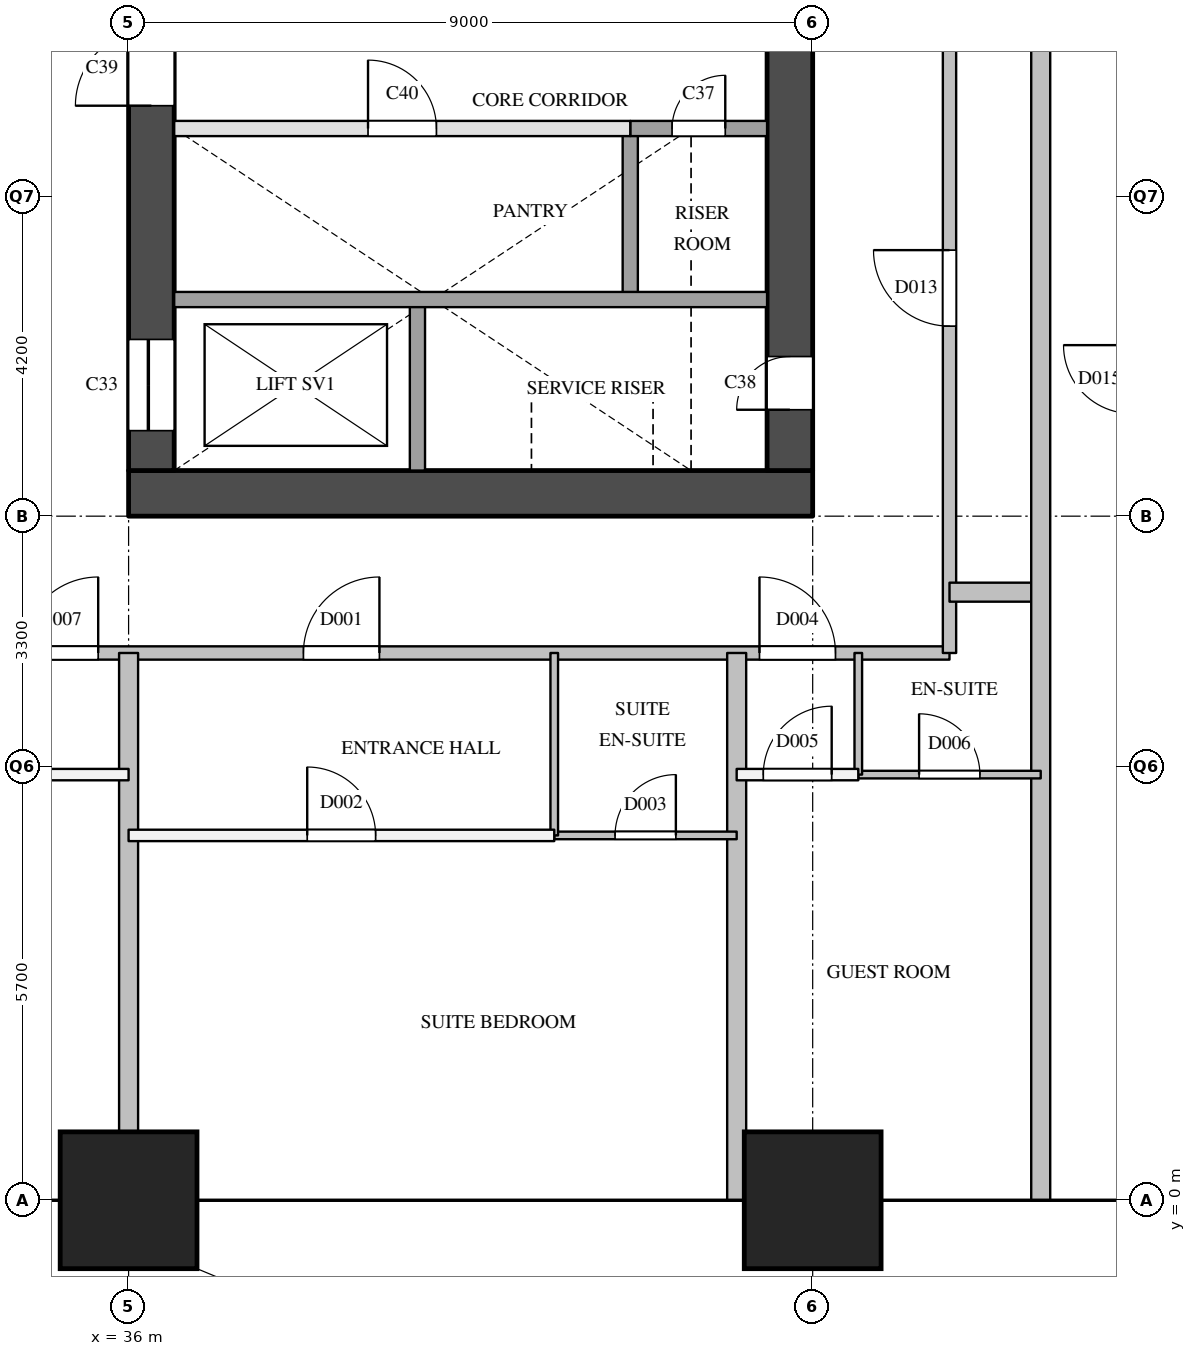
"""IFC4 building model, lengths in metres.
Left out: names, types, materials, properties, quantities, classifications, styles, units other than length and angle.
Written with IfcOpenShell. Run it as: python <this file> out.ifc"""

import sys

from ifc_helpers import new_model, si_unit, direction, frame, frame_2d, origin, origin_2d, place, context, subcontext, project, spatial, rectangle, extrude, element, fill, save


model = new_model("IFC4")
c1 = context("Model", 3, precision=1e-05, world=origin(), true_north=direction((0.0, 1.0)))
c2 = subcontext(c1, "Body", "Model", "MODEL_VIEW")
j1 = project(units=[si_unit("LENGTHUNIT", "METRE"), si_unit("PLANEANGLEUNIT", "RADIAN")], contexts=[c1])
p1 = place(None, origin())
s1 = spatial("IfcSite", under=j1, at=p1, CompositionType="ELEMENT")
p2 = place(p1, origin())
s2 = spatial("IfcBuilding", under=s1, at=p2, CompositionType="ELEMENT")
p3 = place(p2, frame((0.0, 0.0, 81.6)))
s3 = spatial("IfcBuildingStorey", under=s2, at=p3, CompositionType="ELEMENT", Elevation=81.6)
for number, where, z_axis, x_axis in (
    (1, (36.0, 0.0, 0.0), (0.0, 0.0, 1.0), (1.0, 0.0, 0.0)),
    (2, (45.0, 0.0, 0.0), (0.0, 0.0, 1.0), (1.0, 0.0, 0.0)),
):
    element("IfcColumn", number, at=place(p3, frame(where, z_axis=z_axis, x_axis=x_axis)), inside=s3, PredefinedType="COLUMN", context=c2, shape_type="SweptSolid", body=[
        extrude(rectangle(XDim=1.8, YDim=1.8, at=origin_2d()), origin(), (0.0, 0.0, 1.0), 3.8),
    ])
p4 = place(p3, frame((36.0, 9.3, 0.0), z_axis=(0.0, 0.0, 1.0), x_axis=(1.0, 0.0, 0.0)))
e3 = element("IfcWall", 3, at=p4, inside=s3, PredefinedType="SHEAR", context=c2, shape_type="SweptSolid", body=[
    extrude(rectangle(XDim=9.0, YDim=0.6, at=frame_2d((4.5, 0.0))), origin(), (0.0, 0.0, 1.0), 3.5),
])
p5 = place(p3, frame((36.3, 9.6, 0.0), z_axis=(0.0, 0.0, 1.0), x_axis=(0.0, 1.0, 0.0)))
e4 = element("IfcWall", 4, at=p5, inside=s3, PredefinedType="SHEAR", context=c2, shape_type="SweptSolid", body=[
    extrude(rectangle(XDim=12.3, YDim=0.6, at=frame_2d((6.15, 0.0))), origin(), (0.0, 0.0, 1.0), 3.5),
])
p6 = place(p5, frame((0.525, 0.0, 0.0)))
e5 = element("IfcOpeningElement", 5, at=p6, cuts=e4, PredefinedType="OPENING", context=c2, shape_type="SweptSolid", body=[
    extrude(rectangle(XDim=1.2, YDim=2.1, at=frame_2d((0.6, 1.05))), frame((0.0, 0.31, 0.0), z_axis=(0.0, -1.0, 0.0), x_axis=(1.0, 0.0, 0.0)), (0.0, 0.0, 1.0), 0.62),
])
p7 = place(p5, frame((4.8, 0.0, 0.0)))
e6 = element("IfcOpeningElement", 6, at=p7, cuts=e4, PredefinedType="OPENING", context=c2, shape_type="SweptSolid", body=[
    extrude(rectangle(XDim=1.0, YDim=2.1, at=frame_2d((0.5, 1.05))), frame((0.0, 0.31, 0.0), z_axis=(0.0, -1.0, 0.0), x_axis=(1.0, 0.0, 0.0)), (0.0, 0.0, 1.0), 0.62),
])
p8 = place(p3, frame((44.7, 9.6, 0.0), z_axis=(0.0, 0.0, 1.0), x_axis=(0.0, 1.0, 0.0)))
e7 = element("IfcWall", 7, at=p8, inside=s3, PredefinedType="SHEAR", context=c2, shape_type="SweptSolid", body=[
    extrude(rectangle(XDim=12.3, YDim=0.6, at=frame_2d((6.15, 0.0))), origin(), (0.0, 0.0, 1.0), 3.5),
])
p9 = place(p8, frame((0.8, 0.0, 0.0)))
e8 = element("IfcOpeningElement", 8, at=p9, cuts=e7, PredefinedType="OPENING", context=c2, shape_type="SweptSolid", body=[
    extrude(rectangle(XDim=0.7, YDim=2.1, at=frame_2d((0.35, 1.05))), frame((0.0, 0.31, 0.0), z_axis=(0.0, -1.0, 0.0), x_axis=(1.0, 0.0, 0.0)), (0.0, 0.0, 1.0), 0.62),
])
p10 = place(p3, frame((39.8, 9.6, 0.0), z_axis=(0.0, 0.0, 1.0), x_axis=(0.0, 1.0, 0.0)))
e9 = element("IfcWall", 9, at=p10, inside=s3, PredefinedType="SOLIDWALL", context=c2, shape_type="SweptSolid", body=[
    extrude(rectangle(XDim=2.3, YDim=0.2, at=frame_2d((1.15, 0.0))), origin(), (0.0, 0.0, 1.0), 3.5),
])
p11 = place(p3, frame((42.6, 11.9, 0.0), z_axis=(0.0, 0.0, 1.0), x_axis=(0.0, 1.0, 0.0)))
e10 = element("IfcWall", 10, at=p11, inside=s3, PredefinedType="SOLIDWALL", context=c2, shape_type="SweptSolid", body=[
    extrude(rectangle(XDim=2.2, YDim=0.2, at=frame_2d((1.1, 0.0))), origin(), (0.0, 0.0, 1.0), 3.5),
])
p12 = place(p3, frame((36.6, 11.85, 0.0), z_axis=(0.0, 0.0, 1.0), x_axis=(1.0, 0.0, 0.0)))
e11 = element("IfcWall", 11, at=p12, inside=s3, PredefinedType="SOLIDWALL", context=c2, shape_type="SweptSolid", body=[
    extrude(rectangle(XDim=7.8, YDim=0.2, at=frame_2d((3.9, 0.0))), origin(), (0.0, 0.0, 1.0), 3.5),
])
p13 = place(p3, frame((36.6, 14.1, 0.0), z_axis=(0.0, 0.0, 1.0), x_axis=(1.0, 0.0, 0.0)))
e12 = element("IfcWall", 12, at=p13, inside=s3, PredefinedType="PARTITIONING", context=c2, shape_type="SweptSolid", body=[
    extrude(rectangle(XDim=6.0, YDim=0.2, at=frame_2d((3.0, 0.0))), origin(), (0.0, 0.0, 1.0), 3.5),
])
p14 = place(p13, frame((2.55, 0.0, 0.0)))
e13 = element("IfcOpeningElement", 13, at=p14, cuts=e12, PredefinedType="OPENING", context=c2, shape_type="SweptSolid", body=[
    extrude(rectangle(XDim=0.9, YDim=2.1, at=frame_2d((0.45, 1.05))), frame((0.0, 0.11, 0.0), z_axis=(0.0, -1.0, 0.0), x_axis=(1.0, 0.0, 0.0)), (0.0, 0.0, 1.0), 0.22),
])
p15 = place(p3, frame((42.6, 14.1, 0.0), z_axis=(0.0, 0.0, 1.0), x_axis=(1.0, 0.0, 0.0)))
e14 = element("IfcWall", 14, at=p15, inside=s3, PredefinedType="SOLIDWALL", context=c2, shape_type="SweptSolid", body=[
    extrude(rectangle(XDim=1.8, YDim=0.2, at=frame_2d((0.9, 0.0))), origin(), (0.0, 0.0, 1.0), 3.5),
])
p16 = place(p15, frame((0.55, 0.0, 0.0)))
e15 = element("IfcOpeningElement", 15, at=p16, cuts=e14, PredefinedType="OPENING", context=c2, shape_type="SweptSolid", body=[
    extrude(rectangle(XDim=0.7, YDim=2.1, at=frame_2d((0.35, 1.05))), frame((0.0, 0.11, 0.0), z_axis=(0.0, -1.0, 0.0), x_axis=(1.0, 0.0, 0.0)), (0.0, 0.0, 1.0), 0.22),
])
p17 = place(p3, frame((34.2, 7.2, 0.0), z_axis=(0.0, 0.0, 1.0), x_axis=(1.0, 0.0, 0.0)))
e16 = element("IfcWall", 16, at=p17, inside=s3, PredefinedType="PARTITIONING", context=c2, shape_type="SweptSolid", body=[
    extrude(rectangle(XDim=12.6, YDim=0.175, at=frame_2d((6.3, 0.0))), origin(), (0.0, 0.0, 1.0), 3.5),
])
p18 = place(p17, frame((4.1, 0.0, 0.0)))
e17 = element("IfcOpeningElement", 17, at=p18, cuts=e16, PredefinedType="OPENING", context=c2, shape_type="SweptSolid", body=[
    extrude(rectangle(XDim=1.0, YDim=2.1, at=frame_2d((0.5, 1.05))), frame((0.0, 0.097, 0.0), z_axis=(0.0, -1.0, 0.0), x_axis=(1.0, 0.0, 0.0)), (0.0, 0.0, 1.0), 0.195),
])
p19 = place(p17, frame((10.1, 0.0, 0.0)))
e18 = element("IfcOpeningElement", 18, at=p19, cuts=e16, PredefinedType="OPENING", context=c2, shape_type="SweptSolid", body=[
    extrude(rectangle(XDim=1.0, YDim=2.1, at=frame_2d((0.5, 1.05))), frame((0.0, 0.097, 0.0), z_axis=(0.0, -1.0, 0.0), x_axis=(1.0, 0.0, 0.0)), (0.0, 0.0, 1.0), 0.195),
])
p20 = place(p17, frame((0.4, 0.0, 0.0)))
e19 = element("IfcOpeningElement", 19, at=p20, cuts=e16, PredefinedType="OPENING", context=c2, shape_type="SweptSolid", body=[
    extrude(rectangle(XDim=1.0, YDim=2.1, at=frame_2d((0.5, 1.05))), frame((0.0, 0.097, 0.0), z_axis=(0.0, -1.0, 0.0), x_axis=(1.0, 0.0, 0.0)), (0.0, 0.0, 1.0), 0.195),
])
p21 = place(p3, frame((46.8, 7.2, 0.0), z_axis=(0.0, 0.0, 1.0), x_axis=(0.0, 1.0, 0.0)))
e20 = element("IfcWall", 20, at=p21, inside=s3, PredefinedType="PARTITIONING", context=c2, shape_type="SweptSolid", body=[
    extrude(rectangle(XDim=16.49, YDim=0.175, at=frame_2d((8.245, 0.0))), origin(), (0.0, 0.0, 1.0), 3.5),
])
p22 = place(p21, frame((4.3, 0.0, 0.0)))
e21 = element("IfcOpeningElement", 21, at=p22, cuts=e20, PredefinedType="OPENING", context=c2, shape_type="SweptSolid", body=[
    extrude(rectangle(XDim=1.0, YDim=2.1, at=frame_2d((0.5, 1.05))), frame((0.0, 0.097, 0.0), z_axis=(0.0, -1.0, 0.0), x_axis=(1.0, 0.0, 0.0)), (0.0, 0.0, 1.0), 0.195),
])
p23 = place(p21, frame((11.1, 0.0, 0.0)))
e22 = element("IfcOpeningElement", 22, at=p23, cuts=e20, PredefinedType="OPENING", context=c2, shape_type="SweptSolid", body=[
    extrude(rectangle(XDim=1.0, YDim=2.1, at=frame_2d((0.5, 1.05))), frame((0.0, 0.097, 0.0), z_axis=(0.0, -1.0, 0.0), x_axis=(1.0, 0.0, 0.0)), (0.0, 0.0, 1.0), 0.195),
])
p24 = place(p3, frame((36.0, 4.8, 0.0), z_axis=(0.0, 0.0, 1.0), x_axis=(1.0, 0.0, 0.0)))
e23 = element("IfcWall", 23, at=p24, inside=s3, PredefinedType="PARTITIONING", context=c2, shape_type="SweptSolid", body=[
    extrude(rectangle(XDim=5.6, YDim=0.15, at=frame_2d((2.8, 0.0))), origin(), (0.0, 0.0, 1.0), 3.5),
])
p25 = place(p24, frame((2.35, 0.0, 0.0)))
e24 = element("IfcOpeningElement", 24, at=p25, cuts=e23, PredefinedType="OPENING", context=c2, shape_type="SweptSolid", body=[
    extrude(rectangle(XDim=0.9, YDim=2.1, at=frame_2d((0.45, 1.05))), frame((0.0, 0.085, 0.0), z_axis=(0.0, -1.0, 0.0), x_axis=(1.0, 0.0, 0.0)), (0.0, 0.0, 1.0), 0.17),
])
p26 = place(p3, frame((29.4, 5.6, 0.0), z_axis=(0.0, 0.0, 1.0), x_axis=(1.0, 0.0, 0.0)))
e25 = element("IfcWall", 25, at=p26, inside=s3, PredefinedType="PARTITIONING", context=c2, shape_type="SweptSolid", body=[
    extrude(rectangle(XDim=6.6, YDim=0.15, at=frame_2d((3.3, 0.0))), origin(), (0.0, 0.0, 1.0), 3.5),
])
p27 = place(p26, frame((2.85, 0.0, 0.0)))
e26 = element("IfcOpeningElement", 26, at=p27, cuts=e25, PredefinedType="OPENING", context=c2, shape_type="SweptSolid", body=[
    extrude(rectangle(XDim=0.9, YDim=2.1, at=frame_2d((0.45, 1.05))), frame((0.0, 0.085, 0.0), z_axis=(0.0, -1.0, 0.0), x_axis=(1.0, 0.0, 0.0)), (0.0, 0.0, 1.0), 0.17),
])
p28 = place(p3, frame((44.0, 5.6, 0.0), z_axis=(0.0, 0.0, 1.0), x_axis=(1.0, 0.0, 0.0)))
e27 = element("IfcWall", 27, at=p28, inside=s3, PredefinedType="PARTITIONING", context=c2, shape_type="SweptSolid", body=[
    extrude(rectangle(XDim=1.6, YDim=0.15, at=frame_2d((0.8, 0.0))), origin(), (0.0, 0.0, 1.0), 3.5),
])
p29 = place(p28, frame((0.35, 0.0, 0.0)))
e28 = element("IfcOpeningElement", 28, at=p29, cuts=e27, PredefinedType="OPENING", context=c2, shape_type="SweptSolid", body=[
    extrude(rectangle(XDim=0.9, YDim=2.1, at=frame_2d((0.45, 1.05))), frame((0.0, 0.085, 0.0), z_axis=(0.0, -1.0, 0.0), x_axis=(1.0, 0.0, 0.0)), (0.0, 0.0, 1.0), 0.17),
])
p30 = place(p3, frame((46.8, 8.0, 0.0), z_axis=(0.0, 0.0, 1.0), x_axis=(1.0, 0.0, 0.0)))
e29 = element("IfcWall", 29, at=p30, inside=s3, PredefinedType="PARTITIONING", context=c2, shape_type="SweptSolid", body=[
    extrude(rectangle(XDim=1.2, YDim=0.25, at=frame_2d((0.6, 0.0))), origin(), (0.0, 0.0, 1.0), 3.5),
])
p31 = place(p3, frame((36.0, 0.0, 0.0), z_axis=(0.0, 0.0, 1.0), x_axis=(0.0, 1.0, 0.0)))
e30 = element("IfcWall", 30, at=p31, inside=s3, PredefinedType="PARTITIONING", context=c2, shape_type="SweptSolid", body=[
    extrude(rectangle(XDim=7.2, YDim=0.25, at=frame_2d((3.6, 0.0))), origin(), (0.0, 0.0, 1.0), 3.5),
])
p32 = place(p3, frame((44.0, 0.0, 0.0), z_axis=(0.0, 0.0, 1.0), x_axis=(0.0, 1.0, 0.0)))
e31 = element("IfcWall", 31, at=p32, inside=s3, PredefinedType="PARTITIONING", context=c2, shape_type="SweptSolid", body=[
    extrude(rectangle(XDim=7.2, YDim=0.25, at=frame_2d((3.6, 0.0))), origin(), (0.0, 0.0, 1.0), 2.5),
])
p33 = place(p3, frame((48.0, 0.0, 0.0), z_axis=(0.0, 0.0, 1.0), x_axis=(0.0, 1.0, 0.0)))
e32 = element("IfcWall", 32, at=p33, inside=s3, PredefinedType="PARTITIONING", context=c2, shape_type="SweptSolid", body=[
    extrude(rectangle(XDim=16.125, YDim=0.25, at=frame_2d((8.062, 0.0))), origin(), (0.0, 0.0, 1.0), 2.5),
])
p34 = place(p3, frame((41.6, 4.8, 0.0), z_axis=(0.0, 0.0, 1.0), x_axis=(1.0, 0.0, 0.0)))
e33 = element("IfcWall", 33, at=p34, inside=s3, PredefinedType="PARTITIONING", context=c2, shape_type="SweptSolid", body=[
    extrude(rectangle(XDim=2.4, YDim=0.1, at=frame_2d((1.2, 0.0))), origin(), (0.0, 0.0, 1.0), 3.5),
])
p35 = place(p34, frame((0.8, 0.0, 0.0)))
e34 = element("IfcOpeningElement", 34, at=p35, cuts=e33, PredefinedType="OPENING", context=c2, shape_type="SweptSolid", body=[
    extrude(rectangle(XDim=0.8, YDim=2.1, at=frame_2d((0.4, 1.05))), frame((0.0, 0.06, 0.0), z_axis=(0.0, -1.0, 0.0), x_axis=(1.0, 0.0, 0.0)), (0.0, 0.0, 1.0), 0.12),
])
p36 = place(p3, frame((45.6, 5.6, 0.0), z_axis=(0.0, 0.0, 1.0), x_axis=(1.0, 0.0, 0.0)))
e35 = element("IfcWall", 35, at=p36, inside=s3, PredefinedType="PARTITIONING", context=c2, shape_type="SweptSolid", body=[
    extrude(rectangle(XDim=2.4, YDim=0.1, at=frame_2d((1.2, 0.0))), origin(), (0.0, 0.0, 1.0), 3.5),
])
p37 = place(p36, frame((0.8, 0.0, 0.0)))
e36 = element("IfcOpeningElement", 36, at=p37, cuts=e35, PredefinedType="OPENING", context=c2, shape_type="SweptSolid", body=[
    extrude(rectangle(XDim=0.8, YDim=2.1, at=frame_2d((0.4, 1.05))), frame((0.0, 0.06, 0.0), z_axis=(0.0, -1.0, 0.0), x_axis=(1.0, 0.0, 0.0)), (0.0, 0.0, 1.0), 0.12),
])
p38 = place(p3, frame((41.6, 4.8, 0.0), z_axis=(0.0, 0.0, 1.0), x_axis=(0.0, 1.0, 0.0)))
e37 = element("IfcWall", 37, at=p38, inside=s3, PredefinedType="PARTITIONING", context=c2, shape_type="SweptSolid", body=[
    extrude(rectangle(XDim=2.4, YDim=0.1, at=frame_2d((1.2, 0.0))), origin(), (0.0, 0.0, 1.0), 3.5),
])
p39 = place(p3, frame((45.6, 5.6, 0.0), z_axis=(0.0, 0.0, 1.0), x_axis=(0.0, 1.0, 0.0)))
e38 = element("IfcWall", 38, at=p39, inside=s3, PredefinedType="PARTITIONING", context=c2, shape_type="SweptSolid", body=[
    extrude(rectangle(XDim=1.6, YDim=0.1, at=frame_2d((0.8, 0.0))), origin(), (0.0, 0.0, 1.0), 3.5),
])
p40 = place(p6, origin())
e39 = element("IfcDoor", 39, at=p40, inside=s3, OperationType="SLIDING_TO_LEFT", PredefinedType="DOOR", context=c2, shape_type="SweptSolid", body=[
    extrude(rectangle(XDim=1.2, YDim=2.1, at=frame_2d((0.6, 1.05))), frame((0.0, 0.025, 0.0), z_axis=(0.0, -1.0, 0.0), x_axis=(1.0, 0.0, 0.0)), (0.0, 0.0, 1.0), 0.05),
])
fill(e5, e39)
p41 = place(p16, origin())
e40 = element("IfcDoor", 40, at=p41, inside=s3, OperationType="SINGLE_SWING_RIGHT", PredefinedType="DOOR", context=c2, shape_type="SweptSolid", body=[
    extrude(rectangle(XDim=0.7, YDim=2.1, at=frame_2d((0.35, 1.05))), frame((0.0, 0.025, 0.0), z_axis=(0.0, -1.0, 0.0), x_axis=(1.0, 0.0, 0.0)), (0.0, 0.0, 1.0), 0.05),
])
fill(e15, e40)
p42 = place(p9, origin())
e41 = element("IfcDoor", 41, at=p42, inside=s3, OperationType="SINGLE_SWING_LEFT", PredefinedType="DOOR", context=c2, shape_type="SweptSolid", body=[
    extrude(rectangle(XDim=0.7, YDim=2.1, at=frame_2d((0.35, 1.05))), frame((0.0, 0.025, 0.0), z_axis=(0.0, -1.0, 0.0), x_axis=(1.0, 0.0, 0.0)), (0.0, 0.0, 1.0), 0.05),
])
fill(e8, e41)
p43 = place(p7, origin())
e42 = element("IfcDoor", 42, at=p43, inside=s3, OperationType="SINGLE_SWING_LEFT", PredefinedType="DOOR", context=c2, shape_type="SweptSolid", body=[
    extrude(rectangle(XDim=1.0, YDim=2.1, at=frame_2d((0.5, 1.05))), frame((0.0, 0.025, 0.0), z_axis=(0.0, -1.0, 0.0), x_axis=(1.0, 0.0, 0.0)), (0.0, 0.0, 1.0), 0.05),
])
fill(e6, e42)
p44 = place(p14, origin())
e43 = element("IfcDoor", 43, at=p44, inside=s3, OperationType="SINGLE_SWING_LEFT", PredefinedType="DOOR", context=c2, shape_type="SweptSolid", body=[
    extrude(rectangle(XDim=0.9, YDim=2.1, at=frame_2d((0.45, 1.05))), frame((0.0, 0.025, 0.0), z_axis=(0.0, -1.0, 0.0), x_axis=(1.0, 0.0, 0.0)), (0.0, 0.0, 1.0), 0.05),
])
fill(e13, e43)
p45 = place(p18, origin())
e44 = element("IfcDoor", 44, at=p45, inside=s3, OperationType="SINGLE_SWING_RIGHT", PredefinedType="DOOR", context=c2, shape_type="SweptSolid", body=[
    extrude(rectangle(XDim=1.0, YDim=2.1, at=frame_2d((0.5, 1.05))), frame((0.0, 0.025, 0.0), z_axis=(0.0, -1.0, 0.0), x_axis=(1.0, 0.0, 0.0)), (0.0, 0.0, 1.0), 0.05),
])
fill(e17, e44)
p46 = place(p25, origin())
e45 = element("IfcDoor", 45, at=p46, inside=s3, OperationType="SINGLE_SWING_LEFT", PredefinedType="DOOR", context=c2, shape_type="SweptSolid", body=[
    extrude(rectangle(XDim=0.9, YDim=2.1, at=frame_2d((0.45, 1.05))), frame((0.0, 0.025, 0.0), z_axis=(0.0, -1.0, 0.0), x_axis=(1.0, 0.0, 0.0)), (0.0, 0.0, 1.0), 0.05),
])
fill(e24, e45)
p47 = place(p35, origin())
e46 = element("IfcDoor", 46, at=p47, inside=s3, OperationType="SINGLE_SWING_RIGHT", PredefinedType="DOOR", context=c2, shape_type="SweptSolid", body=[
    extrude(rectangle(XDim=0.8, YDim=2.1, at=frame_2d((0.4, 1.05))), frame((0.0, 0.025, 0.0), z_axis=(0.0, -1.0, 0.0), x_axis=(1.0, 0.0, 0.0)), (0.0, 0.0, 1.0), 0.05),
])
fill(e34, e46)
p48 = place(p19, origin())
e47 = element("IfcDoor", 47, at=p48, inside=s3, OperationType="SINGLE_SWING_LEFT", PredefinedType="DOOR", context=c2, shape_type="SweptSolid", body=[
    extrude(rectangle(XDim=1.0, YDim=2.1, at=frame_2d((0.5, 1.05))), frame((0.0, 0.025, 0.0), z_axis=(0.0, -1.0, 0.0), x_axis=(1.0, 0.0, 0.0)), (0.0, 0.0, 1.0), 0.05),
])
fill(e18, e47)
p49 = place(p29, origin())
e48 = element("IfcDoor", 48, at=p49, inside=s3, OperationType="SINGLE_SWING_RIGHT", PredefinedType="DOOR", context=c2, shape_type="SweptSolid", body=[
    extrude(rectangle(XDim=0.9, YDim=2.1, at=frame_2d((0.45, 1.05))), frame((0.0, 0.025, 0.0), z_axis=(0.0, -1.0, 0.0), x_axis=(1.0, 0.0, 0.0)), (0.0, 0.0, 1.0), 0.05),
])
fill(e28, e48)
p50 = place(p37, origin())
e49 = element("IfcDoor", 49, at=p50, inside=s3, OperationType="SINGLE_SWING_LEFT", PredefinedType="DOOR", context=c2, shape_type="SweptSolid", body=[
    extrude(rectangle(XDim=0.8, YDim=2.1, at=frame_2d((0.4, 1.05))), frame((0.0, 0.025, 0.0), z_axis=(0.0, -1.0, 0.0), x_axis=(1.0, 0.0, 0.0)), (0.0, 0.0, 1.0), 0.05),
])
fill(e36, e49)
p51 = place(p20, origin())
e50 = element("IfcDoor", 50, at=p51, inside=s3, OperationType="SINGLE_SWING_RIGHT", PredefinedType="DOOR", context=c2, shape_type="SweptSolid", body=[
    extrude(rectangle(XDim=1.0, YDim=2.1, at=frame_2d((0.5, 1.05))), frame((0.0, 0.025, 0.0), z_axis=(0.0, -1.0, 0.0), x_axis=(1.0, 0.0, 0.0)), (0.0, 0.0, 1.0), 0.05),
])
fill(e19, e50)
p52 = place(p22, origin())
e51 = element("IfcDoor", 51, at=p52, inside=s3, OperationType="SINGLE_SWING_RIGHT", PredefinedType="DOOR", context=c2, shape_type="SweptSolid", body=[
    extrude(rectangle(XDim=1.0, YDim=2.1, at=frame_2d((0.5, 1.05))), frame((0.0, 0.025, 0.0), z_axis=(0.0, -1.0, 0.0), x_axis=(1.0, 0.0, 0.0)), (0.0, 0.0, 1.0), 0.05),
])
fill(e21, e51)
save(model, sys.argv[1])
